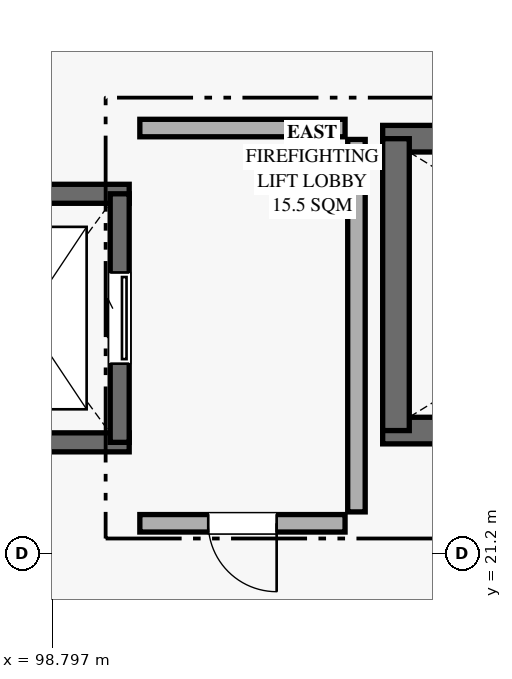
"""IFC4 building model, lengths in metres.
Left out: names, types, materials, properties, quantities, classifications, styles, units other than length and angle.
Written with IfcOpenShell. Run it as: python <this file> out.ifc"""

import sys

from ifc_helpers import new_model, si_unit, direction, frame, frame_2d, origin, place, context, subcontext, project, spatial, rectangle, extrude, element, fill, save


model = new_model("IFC4")
c1 = context("Model", 3, precision=1e-05, world=origin(), true_north=direction((0.0, 1.0)))
c2 = subcontext(c1, "Body", "Model", "MODEL_VIEW")
j1 = project(units=[si_unit("LENGTHUNIT", "METRE"), si_unit("PLANEANGLEUNIT", "RADIAN")], contexts=[c1])
p1 = place(None, origin())
s1 = spatial("IfcSite", under=j1, at=p1, CompositionType="ELEMENT")
p2 = place(p1, origin())
s2 = spatial("IfcBuilding", under=s1, at=p2, CompositionType="ELEMENT")
p3 = place(p2, frame((0.0, 0.0, 24.3)))
s3 = spatial("IfcBuildingStorey", under=s2, at=p3, CompositionType="ELEMENT", Elevation=24.3)
for number, where, z_axis, x_axis in (
    (1, (111.155, 22.82, 0.0), (0.0, 0.0, 1.0), (-1.0, 0.0, 0.0)),
    (2, (103.145, 26.66, 0.0), (0.0, 0.0, 1.0), (1.0, 0.0, 0.0)),
):
    element("IfcWall", number, at=place(p3, frame(where, z_axis=z_axis, x_axis=x_axis)), inside=s3, PredefinedType="SHEAR", context=c2, shape_type="SweptSolid", body=[
        extrude(rectangle(XDim=8.01, YDim=0.35, at=frame_2d((4.005, 0.0))), origin(), (0.0, 0.0, 1.0), 4.23),
    ])
p4 = place(p3, frame((103.32, 22.82, 0.0), z_axis=(0.0, 0.0, 1.0), x_axis=(0.0, 1.0, 0.0)))
e3 = element("IfcWall", 3, at=p4, inside=s3, PredefinedType="SHEAR", context=c2, shape_type="SweptSolid", body=[
    extrude(rectangle(XDim=3.84, YDim=0.35, at=frame_2d((1.92, 0.0))), origin(), (0.0, 0.0, 1.0), 4.23),
])
for number, where, z_axis, x_axis in (
    (4, (99.81, 22.665, 0.0), (0.0, 0.0, 1.0), (-1.0, 0.0, 0.0)),
    (5, (97.09, 25.935, 0.0), (0.0, 0.0, 1.0), (1.0, 0.0, 0.0)),
):
    element("IfcWall", number, at=place(p3, frame(where, z_axis=z_axis, x_axis=x_axis)), inside=s3, PredefinedType="SHEAR", context=c2, shape_type="SweptSolid", body=[
        extrude(rectangle(XDim=2.72, YDim=0.25, at=frame_2d((1.36, 0.0))), origin(), (0.0, 0.0, 1.0), 4.23),
    ])
p5 = place(p3, frame((99.685, 25.935, 0.0), z_axis=(0.0, 0.0, 1.0), x_axis=(0.0, -1.0, 0.0)))
e6 = element("IfcWall", 6, at=p5, inside=s3, PredefinedType="SHEAR", context=c2, shape_type="SweptSolid", body=[
    extrude(rectangle(XDim=3.27, YDim=0.25, at=frame_2d((1.635, 0.0))), origin(), (0.0, 0.0, 1.0), 4.23),
])
p6 = place(p5, frame((1.035, 0.0, 0.0)))
e7 = element("IfcOpeningElement", 7, at=p6, cuts=e6, PredefinedType="OPENING", context=c2, shape_type="SweptSolid", body=[
    extrude(rectangle(XDim=1.2, YDim=2.25, at=frame_2d((0.6, 1.125))), frame((0.0, 0.135, 0.0), z_axis=(0.0, -1.0, 0.0), x_axis=(1.0, 0.0, 0.0)), (0.0, 0.0, 1.0), 0.27),
])
p7 = place(p3, frame((102.65, 21.6, 0.0), z_axis=(0.0, 0.0, 1.0), x_axis=(-1.0, 0.0, 0.0)))
e8 = element("IfcWall", 8, at=p7, inside=s3, PredefinedType="PARTITIONING", context=c2, shape_type="SweptSolid", body=[
    extrude(rectangle(XDim=2.7, YDim=0.23, at=frame_2d((1.35, 0.0))), origin(), (0.0, 0.0, 1.0), 2.98),
])
p8 = place(p7, frame((0.9, 0.0, 0.0)))
e9 = element("IfcOpeningElement", 9, at=p8, cuts=e8, PredefinedType="OPENING", context=c2, shape_type="SweptSolid", body=[
    extrude(rectangle(XDim=0.9, YDim=2.18, at=frame_2d((0.45, 1.09))), frame((0.0, 0.125, 0.0), z_axis=(0.0, -1.0, 0.0), x_axis=(1.0, 0.0, 0.0)), (0.0, 0.0, 1.0), 0.25),
])
p9 = place(p3, frame((99.95, 26.8, 0.0), z_axis=(0.0, 0.0, 1.0), x_axis=(1.0, 0.0, 0.0)))
e10 = element("IfcWall", 10, at=p9, inside=s3, PredefinedType="PARTITIONING", context=c2, shape_type="SweptSolid", body=[
    extrude(rectangle(XDim=2.7, YDim=0.23, at=frame_2d((1.35, 0.0))), origin(), (0.0, 0.0, 1.0), 2.98),
])
p10 = place(p3, frame((102.8, 26.65, 0.0), z_axis=(0.0, 0.0, 1.0), x_axis=(0.0, -1.0, 0.0)))
e11 = element("IfcWall", 11, at=p10, inside=s3, PredefinedType="PARTITIONING", context=c2, shape_type="SweptSolid", body=[
    extrude(rectangle(XDim=4.9, YDim=0.23, at=frame_2d((2.45, 0.0))), origin(), (0.0, 0.0, 1.0), 2.98),
])
p11 = place(p6, origin())
e12 = element("IfcDoor", 12, at=p11, inside=s3, OperationType="SLIDING_TO_LEFT", PredefinedType="DOOR", context=c2, shape_type="SweptSolid", body=[
    extrude(rectangle(XDim=1.2, YDim=2.25, at=frame_2d((0.6, 1.125))), frame((0.0, 0.025, 0.0), z_axis=(0.0, -1.0, 0.0), x_axis=(1.0, 0.0, 0.0)), (0.0, 0.0, 1.0), 0.05),
])
fill(e7, e12)
p12 = place(p8, origin())
e13 = element("IfcDoor", 13, at=p12, inside=s3, OperationType="SINGLE_SWING_LEFT", PredefinedType="DOOR", context=c2, shape_type="SweptSolid", body=[
    extrude(rectangle(XDim=0.9, YDim=2.18, at=frame_2d((0.45, 1.09))), frame((0.0, 0.025, 0.0), z_axis=(0.0, -1.0, 0.0), x_axis=(1.0, 0.0, 0.0)), (0.0, 0.0, 1.0), 0.05),
])
fill(e9, e13)
save(model, sys.argv[1])
